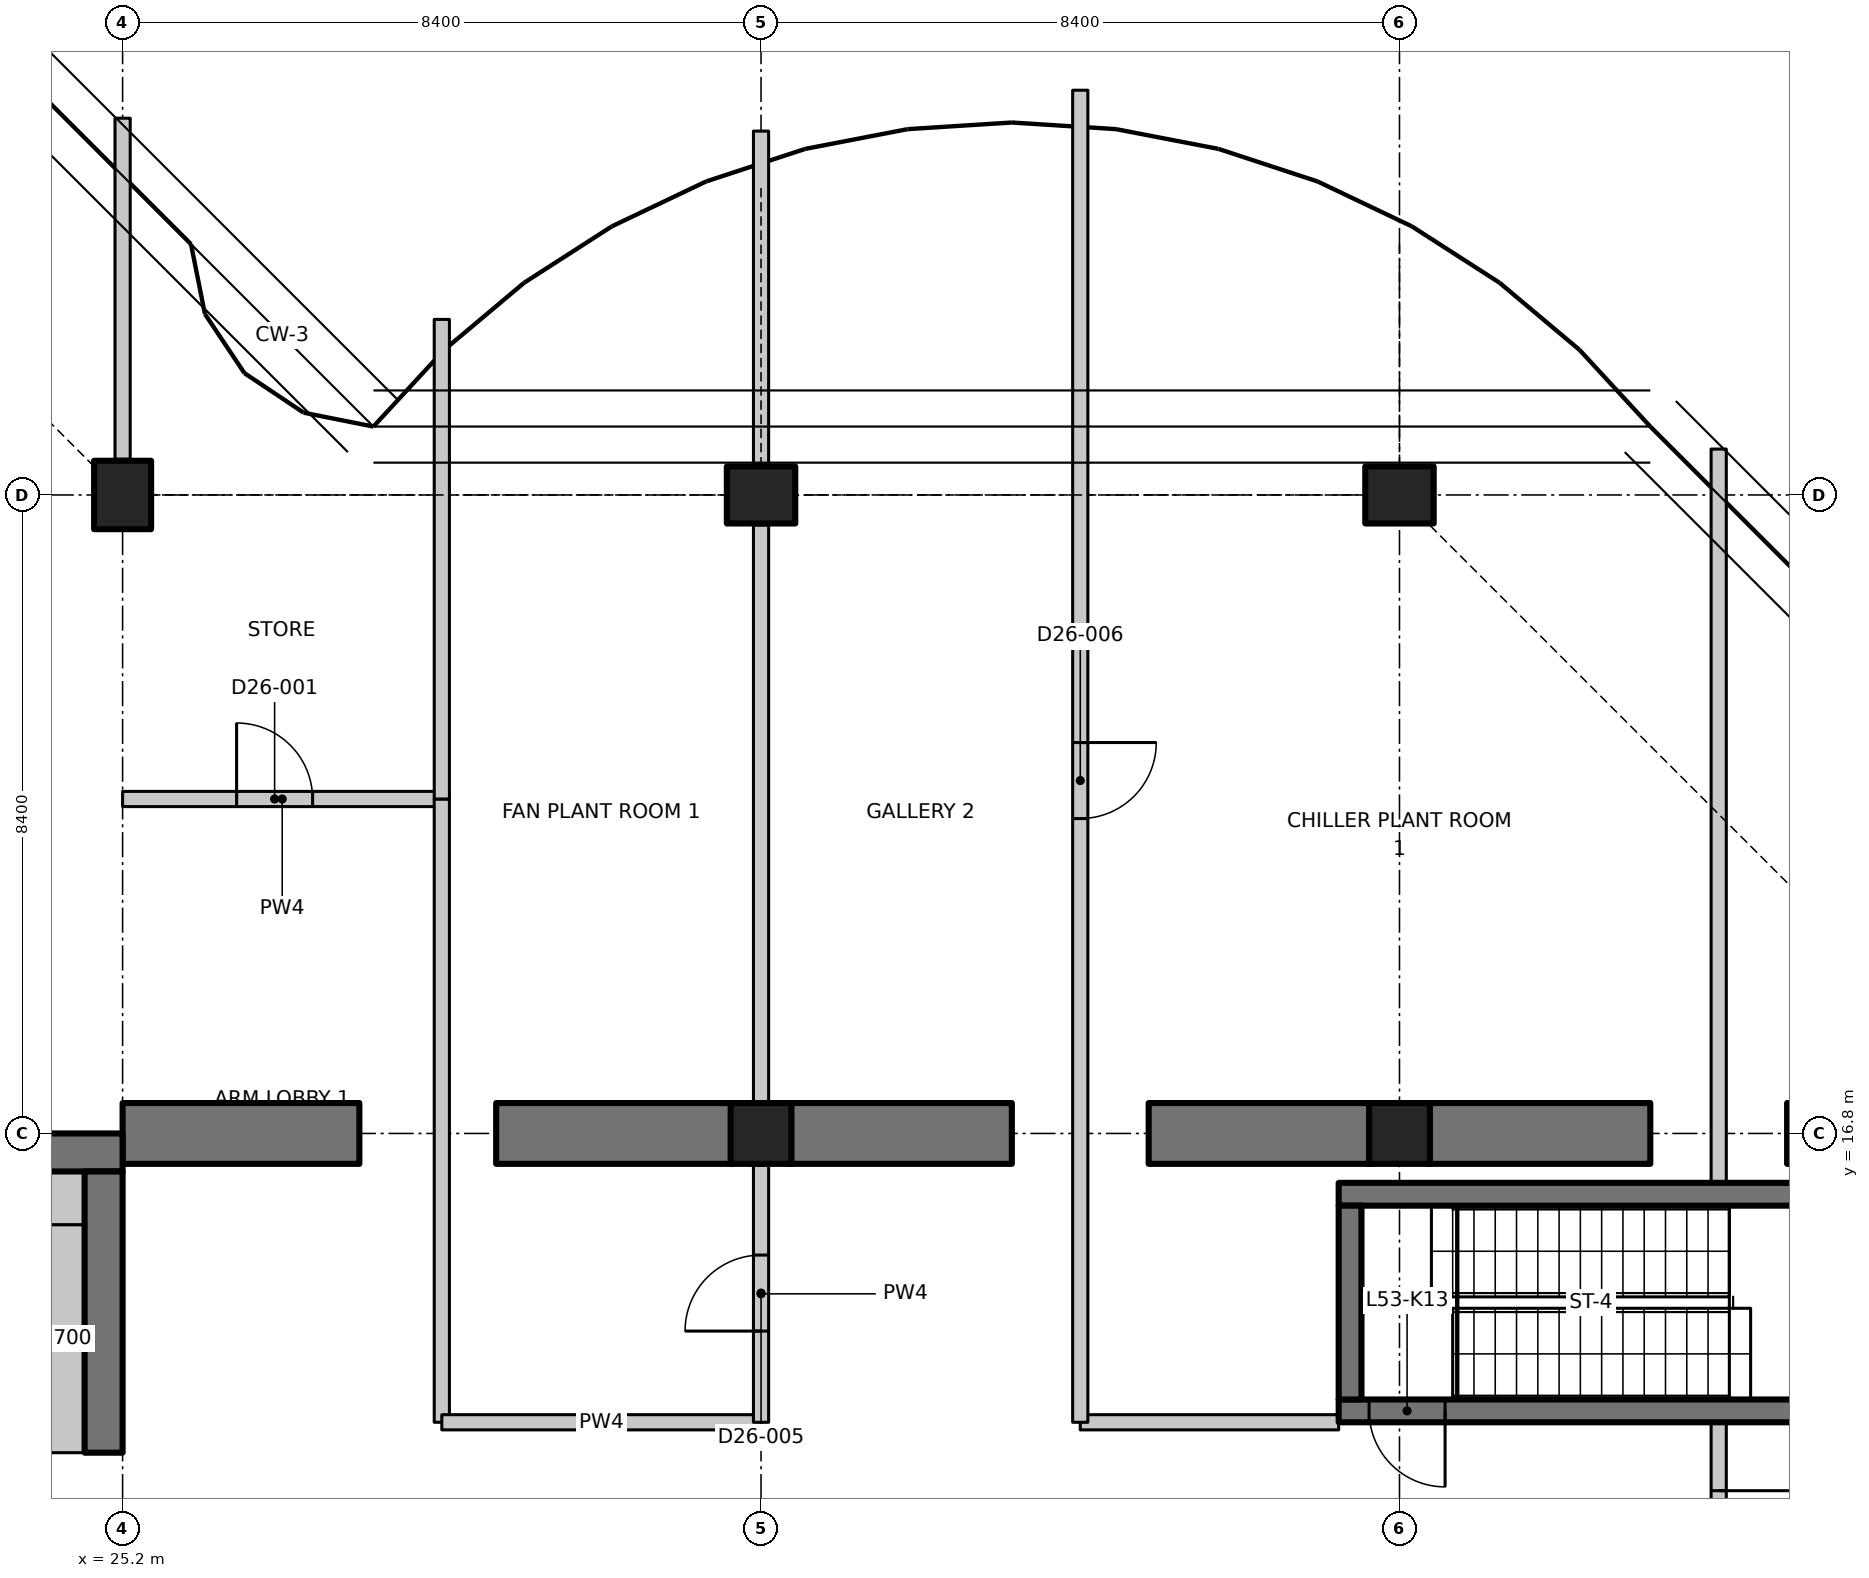
"""IFC4 building model, lengths in metres.
Left out: names, types, materials, properties, quantities, classifications, styles, units other than length and angle.
Written with IfcOpenShell. Run it as: python <this file> out.ifc"""

import sys

from ifc_helpers import new_model, si_unit, direction, frame, frame_2d, origin, origin_2d, place, context, subcontext, project, spatial, polyline, rectangle, outline, extrude, element, fill, save


model = new_model("IFC4")
c1 = context("Model", 3, precision=1e-05, world=origin(), true_north=direction((0.0, 1.0)))
c2 = subcontext(c1, "Body", "Model", "MODEL_VIEW")
j1 = project(units=[si_unit("LENGTHUNIT", "METRE"), si_unit("PLANEANGLEUNIT", "RADIAN")], contexts=[c1])
p1 = place(None, origin())
s1 = spatial("IfcSite", under=j1, at=p1, CompositionType="ELEMENT")
p2 = place(p1, origin())
s2 = spatial("IfcBuilding", under=s1, at=p2, CompositionType="ELEMENT")
p3 = place(p2, frame((0.0, 0.0, 210.9)))
s3 = spatial("IfcBuildingStorey", under=s2, at=p3, CompositionType="ELEMENT", Elevation=210.9)
p4 = place(p3, frame((25.2, 25.2, 0.0), z_axis=(0.0, 0.0, 1.0), x_axis=(1.0, 0.0, 0.0)))
e1 = element("IfcColumn", 1, at=p4, inside=s3, PredefinedType="COLUMN", context=c2, shape_type="SweptSolid", body=[
    extrude(rectangle(XDim=0.75, YDim=0.9, at=origin_2d()), origin(), (0.0, 0.0, 1.0), 4.55),
])
p5 = place(p3, frame((33.6, 16.8, 0.0), z_axis=(0.0, 0.0, 1.0), x_axis=(1.0, 0.0, 0.0)))
e2 = element("IfcColumn", 2, at=p5, inside=s3, PredefinedType="COLUMN", context=c2, shape_type="SweptSolid", body=[
    extrude(rectangle(XDim=0.8, YDim=0.8, at=origin_2d()), origin(), (0.0, 0.0, 1.0), 4.55),
])
p6 = place(p3, frame((33.6, 25.2, 0.0), z_axis=(0.0, 0.0, 1.0), x_axis=(0.0, 1.0, 0.0)))
e3 = element("IfcColumn", 3, at=p6, inside=s3, PredefinedType="COLUMN", context=c2, shape_type="SweptSolid", body=[
    extrude(rectangle(XDim=0.75, YDim=0.9, at=origin_2d()), origin(), (0.0, 0.0, 1.0), 4.55),
])
p7 = place(p3, frame((42.0, 16.8, 0.0), z_axis=(0.0, 0.0, 1.0), x_axis=(1.0, 0.0, 0.0)))
e4 = element("IfcColumn", 4, at=p7, inside=s3, PredefinedType="COLUMN", context=c2, shape_type="SweptSolid", body=[
    extrude(rectangle(XDim=0.8, YDim=0.8, at=origin_2d()), origin(), (0.0, 0.0, 1.0), 4.55),
])
p8 = place(p3, frame((42.0, 25.2, 0.0), z_axis=(0.0, 0.0, 1.0), x_axis=(0.0, 1.0, 0.0)))
e5 = element("IfcColumn", 5, at=p8, inside=s3, PredefinedType="COLUMN", context=c2, shape_type="SweptSolid", body=[
    extrude(rectangle(XDim=0.75, YDim=0.9, at=origin_2d()), origin(), (0.0, 0.0, 1.0), 4.55),
])
for number, where, z_axis, x_axis in (
    (6, (25.2, 16.8, 0.0), (0.0, 0.0, 1.0), (1.0, 0.0, 0.0)),
    (7, (30.115, 16.8, 0.0), (0.0, 0.0, 1.0), (1.0, 0.0, 0.0)),
):
    element("IfcWall", number, at=place(p3, frame(where, z_axis=z_axis, x_axis=x_axis)), inside=s3, PredefinedType="SHEAR", context=c2, shape_type="SweptSolid", body=[
        extrude(rectangle(XDim=3.115, YDim=0.8, at=frame_2d((1.558, 0.0))), origin(), (0.0, 0.0, 1.0), 4.55),
    ])
for number, where, z_axis, x_axis in (
    (8, (33.97, 16.8, 0.0), (0.0, 0.0, 1.0), (1.0, 0.0, 0.0)),
    (9, (38.7, 16.8, 0.0), (0.0, 0.0, 1.0), (1.0, 0.0, 0.0)),
    (10, (42.37, 16.8, 0.0), (0.0, 0.0, 1.0), (1.0, 0.0, 0.0)),
    (11, (47.1, 16.8, 0.0), (0.0, 0.0, 1.0), (1.0, 0.0, 0.0)),
):
    element("IfcWall", number, at=place(p3, frame(where, z_axis=z_axis, x_axis=x_axis)), inside=s3, PredefinedType="SHEAR", context=c2, shape_type="SweptSolid", body=[
        extrude(rectangle(XDim=2.93, YDim=0.8, at=frame_2d((1.465, 0.0))), origin(), (0.0, 0.0, 1.0), 4.55),
    ])
p9 = place(p3, frame((23.8, 16.55, 0.0), z_axis=(0.0, 0.0, 1.0), x_axis=(1.0, 0.0, 0.0)))
e12 = element("IfcWall", 12, at=p9, inside=s3, PredefinedType="SHEAR", context=c2, shape_type="SweptSolid", body=[
    extrude(rectangle(XDim=1.4, YDim=0.5, at=frame_2d((0.7, 0.0))), origin(), (0.0, 0.0, 1.0), 4.55),
])
p10 = place(p3, frame((24.95, 12.6, 0.0), z_axis=(0.0, 0.0, 1.0), x_axis=(0.0, 1.0, 0.0)))
e13 = element("IfcWall", 13, at=p10, inside=s3, PredefinedType="SHEAR", context=c2, shape_type="SweptSolid", body=[
    extrude(rectangle(XDim=3.7, YDim=0.5, at=frame_2d((1.85, 0.0))), origin(), (0.0, 0.0, 1.0), 4.55),
])
p11 = place(p3, frame((24.35, 12.6, 0.0), z_axis=(0.0, 0.0, 1.0), x_axis=(0.0, 1.0, 0.0)))
e14 = element("IfcWall", 14, at=p11, inside=s3, PredefinedType="PARTITIONING", context=c2, shape_type="SweptSolid", body=[
    extrude(rectangle(XDim=3.0, YDim=0.7, at=frame_2d((1.5, 0.0))), origin(), (0.0, 0.0, 1.0), 4.55),
])
p12 = place(p3, frame((23.8, 15.95, 0.0), z_axis=(0.0, 0.0, 1.0), x_axis=(1.0, 0.0, 0.0)))
e15 = element("IfcWall", 15, at=p12, inside=s3, PredefinedType="PARTITIONING", context=c2, shape_type="SweptSolid", body=[
    extrude(rectangle(XDim=0.9, YDim=0.7, at=frame_2d((0.45, 0.0))), origin(), (0.0, 0.0, 1.0), 4.55),
])
p13 = place(p3, frame((49.4, 13.15, 0.0), z_axis=(0.0, 0.0, 1.0), x_axis=(-1.0, 0.0, 0.0)))
e16 = element("IfcWall", 16, at=p13, inside=s3, PredefinedType="SHEAR", context=c2, shape_type="SweptSolid", body=[
    extrude(rectangle(XDim=8.2, YDim=0.3, at=frame_2d((4.1, 0.0))), origin(), (0.0, 0.0, 1.0), 4.55),
])
p14 = place(p13, frame((6.8, 0.0, 0.0)))
e17 = element("IfcOpeningElement", 17, at=p14, cuts=e16, PredefinedType="OPENING", context=c2, shape_type="SweptSolid", body=[
    extrude(rectangle(XDim=1.0, YDim=2.1, at=frame_2d((0.5, 1.05))), frame((0.0, 0.16, 0.0), z_axis=(0.0, -1.0, 0.0), x_axis=(1.0, 0.0, 0.0)), (0.0, 0.0, 1.0), 0.32),
])
p15 = place(p3, frame((41.2, 16.0, 0.0), z_axis=(0.0, 0.0, 1.0), x_axis=(1.0, 0.0, 0.0)))
e18 = element("IfcWall", 18, at=p15, inside=s3, PredefinedType="SHEAR", context=c2, shape_type="SweptSolid", body=[
    extrude(rectangle(XDim=8.2, YDim=0.3, at=frame_2d((4.1, 0.0))), origin(), (0.0, 0.0, 1.0), 4.55),
])
p16 = place(p3, frame((41.35, 13.3, 0.0), z_axis=(0.0, 0.0, 1.0), x_axis=(0.0, 1.0, 0.0)))
e19 = element("IfcWall", 19, at=p16, inside=s3, PredefinedType="SHEAR", context=c2, shape_type="SweptSolid", body=[
    extrude(rectangle(XDim=2.55, YDim=0.3, at=frame_2d((1.275, 0.0))), origin(), (0.0, 0.0, 1.0), 4.55),
])
p17 = place(p3, frame((25.2, 21.2, 0.0), z_axis=(0.0, 0.0, 1.0), x_axis=(1.0, 0.0, 0.0)))
e20 = element("IfcWall", 20, at=p17, inside=s3, PredefinedType="PARTITIONING", context=c2, shape_type="SweptSolid", body=[
    extrude(rectangle(XDim=4.2, YDim=0.2, at=frame_2d((2.1, 0.0))), origin(), (0.0, 0.0, 1.0), 4.53),
])
p18 = place(p17, frame((1.5, 0.0, 0.0)))
e21 = element("IfcOpeningElement", 21, at=p18, cuts=e20, PredefinedType="OPENING", context=c2, shape_type="SweptSolid", body=[
    extrude(rectangle(XDim=1.0, YDim=2.1, at=frame_2d((0.5, 1.05))), frame((0.0, 0.11, 0.0), z_axis=(0.0, -1.0, 0.0), x_axis=(1.0, 0.0, 0.0)), (0.0, 0.0, 1.0), 0.22),
])
p19 = place(p3, frame((29.4, 21.2, 0.0), z_axis=(0.0, 0.0, 1.0), x_axis=(0.0, -1.0, 0.0)))
e22 = element("IfcWall", 22, at=p19, inside=s3, PredefinedType="PARTITIONING", context=c2, shape_type="SweptSolid", body=[
    extrude(rectangle(XDim=8.2, YDim=0.2, at=frame_2d((4.1, 0.0))), origin(), (0.0, 0.0, 1.0), 4.53),
])
p20 = place(p3, frame((29.4, 27.51, 0.0), z_axis=(0.0, 0.0, 1.0), x_axis=(0.0, -1.0, 0.0)))
e23 = element("IfcWall", 23, at=p20, inside=s3, PredefinedType="PARTITIONING", context=c2, shape_type="SweptSolid", body=[
    extrude(outline(polyline([(0.0, 0.0), (6.31, 0.0), (6.31, 4.53), (2.76, 4.53), (2.758, 4.18), (1.862, 4.18), (1.86, 4.53), (0.235, 4.53), (0.0, 4.53), (0.0, 0.0)])), frame((0.0, 0.1, 0.0), z_axis=(0.0, -1.0, 0.0), x_axis=(1.0, 0.0, 0.0)), (0.0, 0.0, 1.0), 0.2),
])
p21 = place(p3, frame((25.2, 25.67, 0.0), z_axis=(0.0, 0.0, 1.0), x_axis=(0.0, 1.0, 0.0)))
e24 = element("IfcWall", 24, at=p21, inside=s3, PredefinedType="PARTITIONING", context=c2, shape_type="SweptSolid", body=[
    extrude(rectangle(XDim=4.487, YDim=0.2, at=frame_2d((2.243, 0.0))), origin(), (0.0, 0.0, 1.0), 4.18),
])
p22 = place(p3, frame((46.2, 13.0, 0.0), z_axis=(0.0, 0.0, 1.0), x_axis=(0.0, -1.0, 0.0)))
e25 = element("IfcWall", 25, at=p22, inside=s3, PredefinedType="PARTITIONING", context=c2, shape_type="SweptSolid", body=[
    extrude(rectangle(XDim=3.4, YDim=0.2, at=frame_2d((1.7, 0.0))), origin(), (0.0, 0.0, 1.0), 4.53),
])
p23 = place(p22, frame((0.9, 0.0, 0.0)))
e26 = element("IfcOpeningElement", 26, at=p23, cuts=e25, PredefinedType="OPENING", context=c2, shape_type="SweptSolid", body=[
    extrude(rectangle(XDim=1.8, YDim=2.1, at=frame_2d((0.9, 1.05))), frame((0.0, 0.11, 0.0), z_axis=(0.0, -1.0, 0.0), x_axis=(1.0, 0.0, 0.0)), (0.0, 0.0, 1.0), 0.22),
])
p24 = place(p3, frame((29.4, 13.0, 0.0), z_axis=(0.0, 0.0, 1.0), x_axis=(1.0, 0.0, 0.0)))
e27 = element("IfcWall", 27, at=p24, inside=s3, PredefinedType="PARTITIONING", context=c2, shape_type="SweptSolid", body=[
    extrude(rectangle(XDim=4.2, YDim=0.2, at=frame_2d((2.1, 0.0))), origin(), (0.0, 0.0, 1.0), 4.53),
])
p25 = place(p3, frame((37.8, 13.0, 0.0), z_axis=(0.0, 0.0, 1.0), x_axis=(1.0, 0.0, 0.0)))
e28 = element("IfcWall", 28, at=p25, inside=s3, PredefinedType="PARTITIONING", context=c2, shape_type="SweptSolid", body=[
    extrude(rectangle(XDim=3.4, YDim=0.2, at=frame_2d((1.7, 0.0))), origin(), (0.0, 0.0, 1.0), 4.53),
])
p26 = place(p3, frame((46.2, 16.15, 0.0), z_axis=(0.0, 0.0, 1.0), x_axis=(0.0, 1.0, 0.0)))
e29 = element("IfcWall", 29, at=p26, inside=s3, PredefinedType="PARTITIONING", context=c2, shape_type="SweptSolid", body=[
    extrude(outline(polyline([(0.0, 0.0), (9.654, 0.0), (9.654, 4.53), (9.25, 4.53), (5.566, 4.53), (5.564, 4.18), (4.136, 4.18), (4.134, 4.53), (0.0, 4.53), (0.0, 0.0)])), frame((0.0, 0.1, 0.0), z_axis=(0.0, -1.0, 0.0), x_axis=(1.0, 0.0, 0.0)), (0.0, 0.0, 1.0), 0.2),
])
p27 = place(p3, frame((33.6, 13.0, 0.0), z_axis=(0.0, 0.0, 1.0), x_axis=(0.0, 1.0, 0.0)))
e30 = element("IfcWall", 30, at=p27, inside=s3, PredefinedType="PARTITIONING", context=c2, shape_type="SweptSolid", body=[
    extrude(rectangle(XDim=3.38, YDim=0.2, at=frame_2d((1.69, 0.0))), origin(), (0.0, 0.0, 1.0), 4.53),
])
p28 = place(p27, frame((1.2, 0.0, 0.0)))
e31 = element("IfcOpeningElement", 31, at=p28, cuts=e30, PredefinedType="OPENING", context=c2, shape_type="SweptSolid", body=[
    extrude(rectangle(XDim=1.0, YDim=2.1, at=frame_2d((0.5, 1.05))), frame((0.0, 0.11, 0.0), z_axis=(0.0, -1.0, 0.0), x_axis=(1.0, 0.0, 0.0)), (0.0, 0.0, 1.0), 0.22),
])
p29 = place(p3, frame((33.6, 17.22, 0.0), z_axis=(0.0, 0.0, 1.0), x_axis=(0.0, 1.0, 0.0)))
e32 = element("IfcWall", 32, at=p29, inside=s3, PredefinedType="PARTITIONING", context=c2, shape_type="SweptSolid", body=[
    extrude(outline(polyline([(0.0, 0.0), (7.585, 0.0), (7.585, 4.18), (7.532, 4.18), (7.53, 4.53), (0.0, 4.53), (0.0, 0.0)])), frame((0.0, 0.1, 0.0), z_axis=(0.0, -1.0, 0.0), x_axis=(1.0, 0.0, 0.0)), (0.0, 0.0, 1.0), 0.2),
])
p30 = place(p3, frame((33.6, 25.595, 0.0), z_axis=(0.0, 0.0, 1.0), x_axis=(0.0, 1.0, 0.0)))
e33 = element("IfcWall", 33, at=p30, inside=s3, PredefinedType="PARTITIONING", context=c2, shape_type="SweptSolid", body=[
    extrude(rectangle(XDim=4.392, YDim=0.2, at=frame_2d((2.196, 0.0))), origin(), (0.0, 0.0, 1.0), 4.18),
])
p31 = place(p3, frame((37.8, 30.525, 0.0), z_axis=(0.0, 0.0, 1.0), x_axis=(0.0, -1.0, 0.0)))
e34 = element("IfcWall", 34, at=p31, inside=s3, PredefinedType="PARTITIONING", context=c2, shape_type="SweptSolid", body=[
    extrude(outline(polyline([(0.0, 0.0), (17.525, 0.0), (17.525, 4.53), (5.775, 4.53), (5.773, 4.18), (4.877, 4.18), (4.875, 4.53), (0.282, 4.53), (0.0, 4.53), (0.0, 0.0)])), frame((0.0, 0.1, 0.0), z_axis=(0.0, -1.0, 0.0), x_axis=(1.0, 0.0, 0.0)), (0.0, 0.0, 1.0), 0.2),
])
p32 = place(p31, frame((8.582, 0.0, 0.0)))
e35 = element("IfcOpeningElement", 35, at=p32, cuts=e34, PredefinedType="OPENING", context=c2, shape_type="SweptSolid", body=[
    extrude(rectangle(XDim=1.0, YDim=2.1, at=frame_2d((0.5, 1.05))), frame((0.0, 0.11, 0.0), z_axis=(0.0, -1.0, 0.0), x_axis=(1.0, 0.0, 0.0)), (0.0, 0.0, 1.0), 0.22),
])
p33 = place(p14, origin())
e36 = element("IfcDoor", 36, at=p33, inside=s3, OperationType="SINGLE_SWING_LEFT", PredefinedType="DOOR", context=c2, shape_type="SweptSolid", body=[
    extrude(rectangle(XDim=1.0, YDim=2.1, at=frame_2d((0.5, 1.05))), frame((0.0, 0.025, 0.0), z_axis=(0.0, -1.0, 0.0), x_axis=(1.0, 0.0, 0.0)), (0.0, 0.0, 1.0), 0.05),
])
fill(e17, e36)
p34 = place(p18, origin())
e37 = element("IfcDoor", 37, at=p34, inside=s3, OperationType="SINGLE_SWING_LEFT", PredefinedType="DOOR", context=c2, shape_type="SweptSolid", body=[
    extrude(rectangle(XDim=1.0, YDim=2.1, at=frame_2d((0.5, 1.05))), frame((0.0, 0.025, 0.0), z_axis=(0.0, -1.0, 0.0), x_axis=(1.0, 0.0, 0.0)), (0.0, 0.0, 1.0), 0.05),
])
fill(e21, e37)
p35 = place(p23, origin())
e38 = element("IfcDoor", 38, at=p35, inside=s3, OperationType="DOUBLE_DOOR_SINGLE_SWING", PredefinedType="DOOR", context=c2, shape_type="SweptSolid", body=[
    extrude(rectangle(XDim=1.8, YDim=2.1, at=frame_2d((0.9, 1.05))), frame((0.0, 0.025, 0.0), z_axis=(0.0, -1.0, 0.0), x_axis=(1.0, 0.0, 0.0)), (0.0, 0.0, 1.0), 0.05),
])
fill(e26, e38)
p36 = place(p28, origin())
e39 = element("IfcDoor", 39, at=p36, inside=s3, OperationType="SINGLE_SWING_LEFT", PredefinedType="DOOR", context=c2, shape_type="SweptSolid", body=[
    extrude(rectangle(XDim=1.0, YDim=2.1, at=frame_2d((0.5, 1.05))), frame((0.0, 0.025, 0.0), z_axis=(0.0, -1.0, 0.0), x_axis=(1.0, 0.0, 0.0)), (0.0, 0.0, 1.0), 0.05),
])
fill(e31, e39)
p37 = place(p32, origin())
e40 = element("IfcDoor", 40, at=p37, inside=s3, OperationType="SINGLE_SWING_LEFT", PredefinedType="DOOR", context=c2, shape_type="SweptSolid", body=[
    extrude(rectangle(XDim=1.0, YDim=2.1, at=frame_2d((0.5, 1.05))), frame((0.0, 0.025, 0.0), z_axis=(0.0, -1.0, 0.0), x_axis=(1.0, 0.0, 0.0)), (0.0, 0.0, 1.0), 0.05),
])
fill(e35, e40)
save(model, sys.argv[1])
